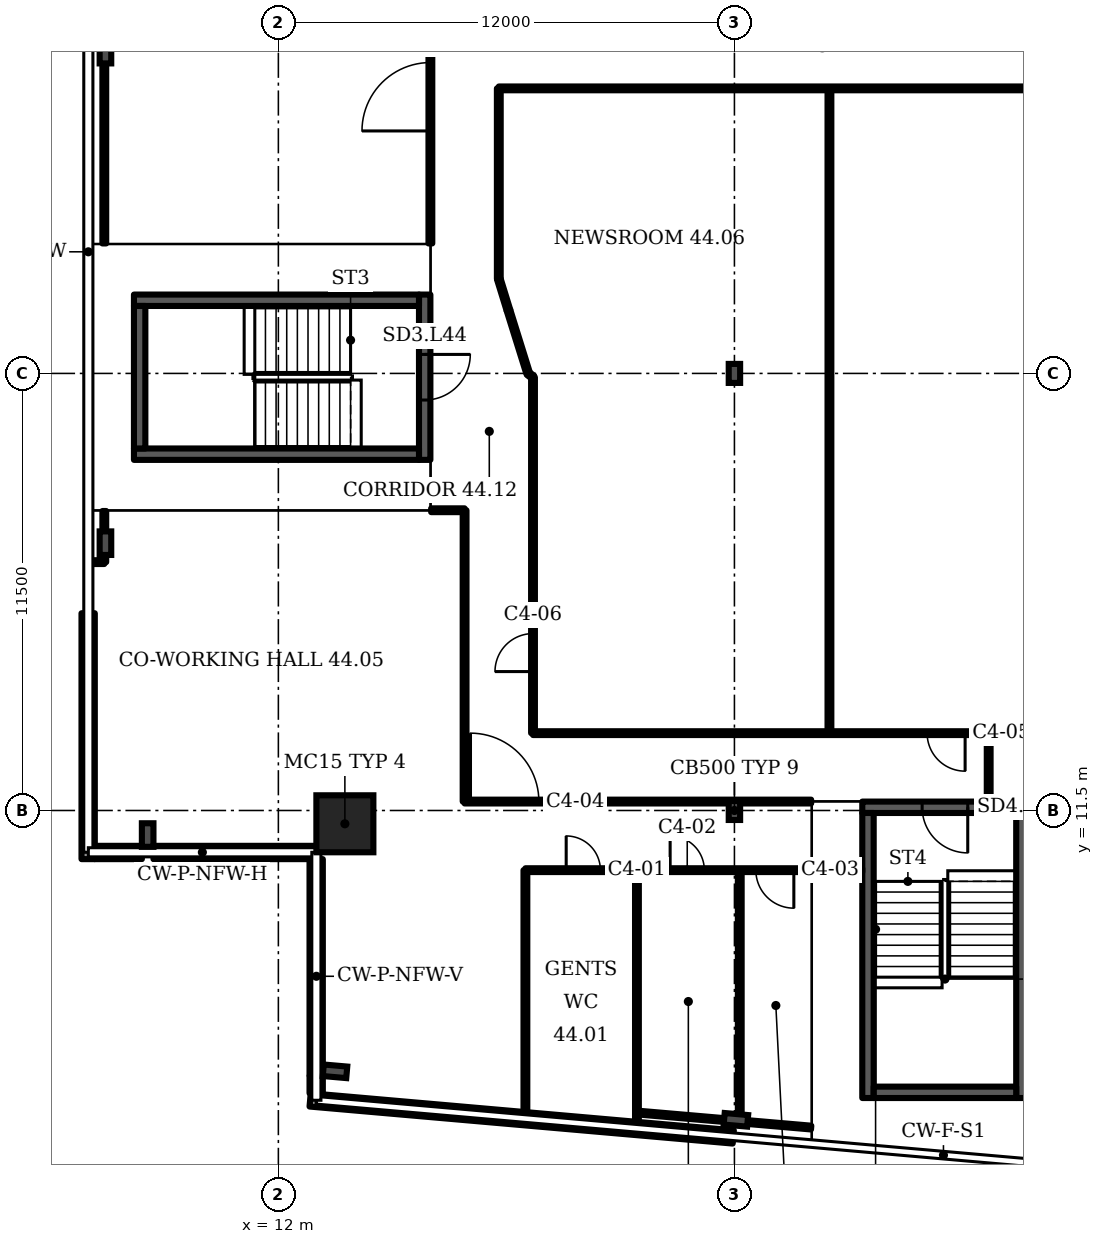
"""IFC4 building model, lengths in metres.
Left out: names, types, materials, properties, quantities, classifications, styles, units other than length and angle.
Written with IfcOpenShell. Run it as: python <this file> out.ifc"""

import sys

from ifc_helpers import new_model, si_unit, direction, frame, frame_2d, origin, origin_2d, place, context, subcontext, project, spatial, rectangle, i_section, extrude, element, fill, save


model = new_model("IFC4")
c1 = context("Model", 3, precision=1e-05, world=origin(), true_north=direction((0.0, 1.0)))
c2 = subcontext(c1, "Body", "Model", "MODEL_VIEW")
j1 = project(units=[si_unit("LENGTHUNIT", "METRE"), si_unit("PLANEANGLEUNIT", "RADIAN")], contexts=[c1])
p1 = place(None, origin())
s1 = spatial("IfcSite", under=j1, at=p1, CompositionType="ELEMENT")
p2 = place(p1, origin())
s2 = spatial("IfcBuilding", under=s1, at=p2, CompositionType="ELEMENT")
p3 = place(p2, frame((0.0, 0.0, 180.7)))
s3 = spatial("IfcBuildingStorey", under=s2, at=p3, CompositionType="ELEMENT", Elevation=180.7)
p4 = place(p3, frame((13.75, 11.15, 0.0), z_axis=(0.0, 0.0, 1.0), x_axis=(1.0, 0.0, 0.0)))
e1 = element("IfcColumn", 1, at=p4, inside=s3, PredefinedType="COLUMN", context=c2, shape_type="SweptSolid", body=[
    extrude(rectangle(XDim=1.5, YDim=1.5, at=origin_2d()), origin(), (0.0, 0.0, 1.0), 3.6),
])
for number, where, z_axis, x_axis in (
    (2, (13.491, 4.637, 0.0), (0.0, 0.0, 1.0), (-0.087, -0.996, 0.0)),
    (3, (24.039, 3.361, 0.0), (0.0, 0.0, 1.0), (-0.087, -0.996, 0.0)),
    (4, (7.45, 31.467, 0.0), (0.0, 0.0, 1.0), (-1.0, 0.0, 0.0)),
    (5, (7.45, 18.533, 0.0), (0.0, 0.0, 1.0), (-1.0, 0.0, 0.0)),
    (6, (8.561, 10.854, 0.0), (0.0, 0.0, 1.0), (-1.0, 0.0, 0.0)),
):
    element("IfcColumn", number, at=place(p3, frame(where, z_axis=z_axis, x_axis=x_axis)), inside=s3, PredefinedType="COLUMN", context=c2, shape_type="SweptSolid", body=[
        extrude(i_section(OverallWidth=0.305, OverallDepth=0.62, WebThickness=0.021, FlangeThickness=0.04, FilletRadius=0.027, at=origin_2d()), origin(), (0.0, 0.0, 1.0), 3.6),
    ])
for number, where, z_axis, x_axis in (
    (7, (24.0, 11.5, 0.0), (0.0, 0.0, 1.0), (1.0, 0.0, 0.0)),
    (8, (24.0, 23.0, 0.0), (0.0, 0.0, 1.0), (1.0, 0.0, 0.0)),
):
    element("IfcColumn", number, at=place(p3, frame(where, z_axis=z_axis, x_axis=x_axis)), inside=s3, PredefinedType="COLUMN", context=c2, shape_type="SweptSolid", body=[
        extrude(i_section(OverallWidth=0.3, OverallDepth=0.5, WebThickness=0.014, FlangeThickness=0.028, FilletRadius=0.027, at=origin_2d()), origin(), (0.0, 0.0, 1.0), 3.6),
    ])
p5 = place(p3, frame((12.835, 3.885, 0.0), z_axis=(0.0, 0.0, 1.0), x_axis=(0.996199, -0.087154, 0.0)))
e9 = element("IfcWall", 9, at=p5, inside=s3, PredefinedType="SOLIDWALL", context=c2, shape_type="SweptSolid", body=[
    extrude(rectangle(XDim=11.177, YDim=0.35, at=frame_2d((5.588, 0.0))), origin(), (0.0, 0.0, 1.0), 1.0),
])
p6 = place(p3, frame((6.995, 16.69, 0.0), z_axis=(0.0, 0.0, 1.0), x_axis=(0.0, -1.0, 0.0)))
e10 = element("IfcWall", 10, at=p6, inside=s3, PredefinedType="SOLIDWALL", context=c2, shape_type="SweptSolid", body=[
    extrude(rectangle(XDim=6.47, YDim=0.35, at=frame_2d((3.235, 0.0))), origin(), (0.0, 0.0, 1.0), 1.0),
])
p7 = place(p3, frame((7.17, 10.395, 0.0), z_axis=(0.0, 0.0, 1.0), x_axis=(1.0, 0.0, 0.0)))
e11 = element("IfcWall", 11, at=p7, inside=s3, PredefinedType="SOLIDWALL", context=c2, shape_type="SweptSolid", body=[
    extrude(rectangle(XDim=1.238, YDim=0.35, at=frame_2d((0.619, 0.0))), origin(), (0.0, 0.0, 1.0), 1.0),
])
p8 = place(p3, frame((8.713, 10.395, 0.0), z_axis=(0.0, 0.0, 1.0), x_axis=(1.0, 0.0, 0.0)))
e12 = element("IfcWall", 12, at=p8, inside=s3, PredefinedType="SOLIDWALL", context=c2, shape_type="SweptSolid", body=[
    extrude(rectangle(XDim=4.287, YDim=0.35, at=frame_2d((2.143, 0.0))), origin(), (0.0, 0.0, 1.0), 1.0),
])
p9 = place(p3, frame((12.995, 10.22, 0.0), z_axis=(0.0, 0.0, 1.0), x_axis=(0.0, -1.0, 0.0)))
e13 = element("IfcWall", 13, at=p9, inside=s3, PredefinedType="SOLIDWALL", context=c2, shape_type="SweptSolid", body=[
    extrude(rectangle(XDim=5.693, YDim=0.35, at=frame_2d((2.847, 0.0))), origin(), (0.0, 0.0, 1.0), 1.0),
])
p10 = place(p3, frame((12.995, 4.512, 0.0), z_axis=(0.0, 0.0, 1.0), x_axis=(0.0, -1.0, 0.0)))
e14 = element("IfcWall", 14, at=p10, inside=s3, PredefinedType="SOLIDWALL", context=c2, shape_type="SweptSolid", body=[
    extrude(rectangle(XDim=0.454, YDim=0.35, at=frame_2d((0.227, 0.0))), origin(), (0.0, 0.0, 1.0), 1.0),
])
p11 = place(p3, frame((15.85, 20.725, 0.0), z_axis=(0.0, 0.0, 1.0), x_axis=(0.0, 1.0, 0.0)))
e15 = element("IfcWall", 15, at=p11, inside=s3, PredefinedType="SHEAR", context=c2, shape_type="SweptSolid", body=[
    extrude(rectangle(XDim=4.35, YDim=0.3, at=frame_2d((2.175, 0.0))), origin(), (0.0, 0.0, 1.0), 3.2),
])
p12 = place(p11, frame((1.575, 0.0, 0.0)))
e16 = element("IfcOpeningElement", 16, at=p12, cuts=e15, PredefinedType="OPENING", context=c2, shape_type="SweptSolid", body=[
    extrude(rectangle(XDim=1.2, YDim=2.1, at=frame_2d((0.6, 1.05))), frame((0.0, 0.16, 0.0), z_axis=(0.0, -1.0, 0.0), x_axis=(1.0, 0.0, 0.0)), (0.0, 0.0, 1.0), 0.32),
])
p13 = place(p3, frame((27.364, 11.584, 0.0), z_axis=(0.0, 0.0, 1.0), x_axis=(1.0, 0.0, 0.0)))
e17 = element("IfcWall", 17, at=p13, inside=s3, PredefinedType="SHEAR", context=c2, shape_type="SweptSolid", body=[
    extrude(rectangle(XDim=4.35, YDim=0.3, at=frame_2d((2.175, 0.0))), origin(), (0.0, 0.0, 1.0), 3.2),
])
p14 = place(p13, frame((1.575, 0.0, 0.0)))
e18 = element("IfcOpeningElement", 18, at=p14, cuts=e17, PredefinedType="OPENING", context=c2, shape_type="SweptSolid", body=[
    extrude(rectangle(XDim=1.2, YDim=2.1, at=frame_2d((0.6, 1.05))), frame((0.0, 0.16, 0.0), z_axis=(0.0, -1.0, 0.0), x_axis=(1.0, 0.0, 0.0)), (0.0, 0.0, 1.0), 0.32),
])
p15 = place(p3, frame((7.02, 18.035, 0.0), z_axis=(0.0, 0.0, 1.0), x_axis=(1.0, 0.0, 0.0)))
e19 = element("IfcWall", 19, at=p15, inside=s3, PredefinedType="PARTITIONING", context=c2, shape_type="SweptSolid", body=[
    extrude(rectangle(XDim=0.4, YDim=0.1, at=frame_2d((0.2, 0.0))), origin(), (0.0, 0.0, 1.0), 3.2),
])
p16 = place(p3, frame((7.42, 18.035, 0.0), z_axis=(0.0, 0.0, 1.0), x_axis=(0.0, 1.0, 0.0)))
e20 = element("IfcWall", 20, at=p16, inside=s3, PredefinedType="PARTITIONING", context=c2, shape_type="SweptSolid", body=[
    extrude(rectangle(XDim=1.345, YDim=0.1, at=frame_2d((0.672, 0.0))), origin(), (0.0, 0.0, 1.0), 2.58),
])
p17 = place(p3, frame((7.42, 26.42, 0.0), z_axis=(0.0, 0.0, 1.0), x_axis=(0.0, 1.0, 0.0)))
e21 = element("IfcWall", 21, at=p17, inside=s3, PredefinedType="PARTITIONING", context=c2, shape_type="SweptSolid", body=[
    extrude(rectangle(XDim=15.56, YDim=0.1, at=frame_2d((7.78, 0.0))), origin(), (0.0, 0.0, 1.0), 2.58),
])
p18 = place(p3, frame((16.0, 26.42, 0.0), z_axis=(0.0, 0.0, 1.0), x_axis=(0.0, 1.0, 0.0)))
e22 = element("IfcWall", 22, at=p18, inside=s3, PredefinedType="PARTITIONING", context=c2, shape_type="SweptSolid", body=[
    extrude(rectangle(XDim=7.56, YDim=0.1, at=frame_2d((3.78, 0.0))), origin(), (0.0, 0.0, 1.0), 3.2),
])
p19 = place(p18, frame((2.96, 0.0, 0.0)))
e23 = element("IfcOpeningElement", 23, at=p19, cuts=e22, PredefinedType="OPENING", context=c2, shape_type="SweptSolid", body=[
    extrude(rectangle(XDim=1.8, YDim=2.1, at=frame_2d((0.9, 1.05))), frame((0.0, 0.06, 0.0), z_axis=(0.0, -1.0, 0.0), x_axis=(1.0, 0.0, 0.0)), (0.0, 0.0, 1.0), 0.12),
])
p20 = place(p3, frame((16.02, 19.4, 0.0), z_axis=(0.0, 0.0, 1.0), x_axis=(1.0, 0.0, 0.0)))
e24 = element("IfcWall", 24, at=p20, inside=s3, PredefinedType="PARTITIONING", context=c2, shape_type="SweptSolid", body=[
    extrude(rectangle(XDim=0.88, YDim=0.1, at=frame_2d((0.44, 0.0))), origin(), (0.0, 0.0, 1.0), 3.2),
])
p21 = place(p3, frame((16.9, 11.735, 0.0), z_axis=(0.0, 0.0, 1.0), x_axis=(0.0, 1.0, 0.0)))
e25 = element("IfcWall", 25, at=p21, inside=s3, PredefinedType="PARTITIONING", context=c2, shape_type="SweptSolid", body=[
    extrude(rectangle(XDim=7.665, YDim=0.1, at=frame_2d((3.833, 0.0))), origin(), (0.0, 0.0, 1.0), 3.2),
])
p22 = place(p3, frame((16.9, 11.735, 0.0), z_axis=(0.0, 0.0, 1.0), x_axis=(1.0, 0.0, 0.0)))
e26 = element("IfcWall", 26, at=p22, inside=s3, PredefinedType="PARTITIONING", context=c2, shape_type="SweptSolid", body=[
    extrude(rectangle(XDim=9.119, YDim=0.1, at=frame_2d((4.56, 0.0))), origin(), (0.0, 0.0, 1.0), 3.2),
])
p23 = place(p22, frame((0.155, 0.0, 0.0)))
e27 = element("IfcOpeningElement", 27, at=p23, cuts=e26, PredefinedType="OPENING", context=c2, shape_type="SweptSolid", body=[
    extrude(rectangle(XDim=1.8, YDim=2.1, at=frame_2d((0.9, 1.05))), frame((0.0, 0.06, 0.0), z_axis=(0.0, -1.0, 0.0), x_axis=(1.0, 0.0, 0.0)), (0.0, 0.0, 1.0), 0.12),
])
p24 = place(p3, frame((17.8, 25.485, 0.0), z_axis=(0.0, 0.0, 1.0), x_axis=(0.0, 1.0, 0.0)))
e28 = element("IfcWall", 28, at=p24, inside=s3, PredefinedType="PARTITIONING", context=c2, shape_type="SweptSolid", body=[
    extrude(rectangle(XDim=5.015, YDim=0.1, at=frame_2d((2.507, 0.0))), origin(), (0.0, 0.0, 1.0), 3.2),
])
p25 = place(p3, frame((17.8, 30.5, 0.0), z_axis=(0.0, 0.0, 1.0), x_axis=(1.0, 0.0, 0.0)))
e29 = element("IfcWall", 29, at=p25, inside=s3, PredefinedType="PARTITIONING", context=c2, shape_type="SweptSolid", body=[
    extrude(rectangle(XDim=19.05, YDim=0.1, at=frame_2d((9.525, 0.0))), origin(), (0.0, 0.0, 1.0), 3.2),
])
p26 = place(p3, frame((18.055, 24.66, 0.0), z_axis=(0.0, 0.0, 1.0), x_axis=(-0.295119, 0.955462, 0.0)))
e30 = element("IfcWall", 30, at=p26, inside=s3, PredefinedType="PARTITIONING", context=c2, shape_type="SweptSolid", body=[
    extrude(rectangle(XDim=0.864, YDim=0.1, at=frame_2d((0.432, 0.0))), origin(), (0.0, 0.0, 1.0), 3.2),
])
p27 = place(p3, frame((18.5, 3.414, 0.0), z_axis=(0.0, 0.0, 1.0), x_axis=(0.0, 1.0, 0.0)))
e31 = element("IfcWall", 31, at=p27, inside=s3, PredefinedType="PARTITIONING", context=c2, shape_type="SweptSolid", body=[
    extrude(rectangle(XDim=6.516, YDim=0.1, at=frame_2d((3.258, 0.0))), origin(), (0.0, 0.0, 1.0), 2.58),
])
p28 = place(p3, frame((18.5, 9.93, 0.0), z_axis=(0.0, 0.0, 1.0), x_axis=(1.0, 0.0, 0.0)))
e32 = element("IfcWall", 32, at=p28, inside=s3, PredefinedType="PARTITIONING", context=c2, shape_type="SweptSolid", body=[
    extrude(rectangle(XDim=8.864, YDim=0.1, at=frame_2d((4.432, 0.0))), origin(), (0.0, 0.0, 1.0), 3.2),
])
p29 = place(p28, frame((1.073, 0.0, 0.0)))
e33 = element("IfcOpeningElement", 33, at=p29, cuts=e32, PredefinedType="OPENING", context=c2, shape_type="SweptSolid", body=[
    extrude(rectangle(XDim=0.9, YDim=2.1, at=frame_2d((0.45, 1.05))), frame((0.0, 0.06, 0.0), z_axis=(0.0, -1.0, 0.0), x_axis=(1.0, 0.0, 0.0)), (0.0, 0.0, 1.0), 0.12),
])
p30 = place(p28, frame((3.808, 0.0, 0.0)))
e34 = element("IfcOpeningElement", 34, at=p30, cuts=e32, PredefinedType="OPENING", context=c2, shape_type="SweptSolid", body=[
    extrude(rectangle(XDim=0.9, YDim=2.1, at=frame_2d((0.45, 1.05))), frame((0.0, 0.06, 0.0), z_axis=(0.0, -1.0, 0.0), x_axis=(1.0, 0.0, 0.0)), (0.0, 0.0, 1.0), 0.12),
])
p31 = place(p28, frame((6.063, 0.0, 0.0)))
e35 = element("IfcOpeningElement", 35, at=p31, cuts=e32, PredefinedType="OPENING", context=c2, shape_type="SweptSolid", body=[
    extrude(rectangle(XDim=1.0, YDim=2.1, at=frame_2d((0.5, 1.05))), frame((0.0, 0.06, 0.0), z_axis=(0.0, -1.0, 0.0), x_axis=(1.0, 0.0, 0.0)), (0.0, 0.0, 1.0), 0.12),
])
p32 = place(p3, frame((18.575, 22.995, 0.0), z_axis=(0.0, 0.0, 1.0), x_axis=(-0.298155, 0.954516, 0.0)))
e36 = element("IfcWall", 36, at=p32, inside=s3, PredefinedType="PARTITIONING", context=c2, shape_type="SweptSolid", body=[
    extrude(rectangle(XDim=1.744, YDim=0.1, at=frame_2d((0.872, 0.0))), origin(), (0.0, 0.0, 1.0), 3.2),
])
p33 = place(p3, frame((18.7, 22.9, 0.0), z_axis=(0.0, 0.0, 1.0), x_axis=(-0.795501, 0.605948, 0.0)))
e37 = element("IfcWall", 37, at=p33, inside=s3, PredefinedType="PARTITIONING", context=c2, shape_type="SweptSolid", body=[
    extrude(rectangle(XDim=0.157, YDim=0.1, at=frame_2d((0.079, 0.0))), origin(), (0.0, 0.0, 1.0), 3.2),
])
p34 = place(p3, frame((18.7, 13.535, 0.0), z_axis=(0.0, 0.0, 1.0), x_axis=(0.0, 1.0, 0.0)))
e38 = element("IfcWall", 38, at=p34, inside=s3, PredefinedType="PARTITIONING", context=c2, shape_type="SweptSolid", body=[
    extrude(rectangle(XDim=9.365, YDim=0.1, at=frame_2d((4.683, 0.0))), origin(), (0.0, 0.0, 1.0), 3.2),
])
p35 = place(p34, frame((1.62, 0.0, 0.0)))
e39 = element("IfcOpeningElement", 39, at=p35, cuts=e38, PredefinedType="OPENING", context=c2, shape_type="SweptSolid", body=[
    extrude(rectangle(XDim=1.0, YDim=2.1, at=frame_2d((0.5, 1.05))), frame((0.0, 0.06, 0.0), z_axis=(0.0, -1.0, 0.0), x_axis=(1.0, 0.0, 0.0)), (0.0, 0.0, 1.0), 0.12),
])
p36 = place(p3, frame((18.7, 13.535, 0.0), z_axis=(0.0, 0.0, 1.0), x_axis=(1.0, 0.0, 0.0)))
e40 = element("IfcWall", 40, at=p36, inside=s3, PredefinedType="PARTITIONING", context=c2, shape_type="SweptSolid", body=[
    extrude(rectangle(XDim=11.99, YDim=0.1, at=frame_2d((5.995, 0.0))), origin(), (0.0, 0.0, 1.0), 3.2),
])
p37 = place(p36, frame((10.37, 0.0, 0.0)))
e41 = element("IfcOpeningElement", 41, at=p37, cuts=e40, PredefinedType="OPENING", context=c2, shape_type="SweptSolid", body=[
    extrude(rectangle(XDim=1.0, YDim=2.1, at=frame_2d((0.5, 1.05))), frame((0.0, 0.06, 0.0), z_axis=(0.0, -1.0, 0.0), x_axis=(1.0, 0.0, 0.0)), (0.0, 0.0, 1.0), 0.12),
])
p38 = place(p3, frame((21.435, 3.165, 0.0), z_axis=(0.0, 0.0, 1.0), x_axis=(0.0, 1.0, 0.0)))
e42 = element("IfcWall", 42, at=p38, inside=s3, PredefinedType="PARTITIONING", context=c2, shape_type="SweptSolid", body=[
    extrude(rectangle(XDim=6.765, YDim=0.1, at=frame_2d((3.382, 0.0))), origin(), (0.0, 0.0, 1.0), 2.58),
])
p39 = place(p3, frame((24.14, 3.32, 0.0), z_axis=(0.0, 0.0, 1.0), x_axis=(0.0, 1.0, 0.0)))
e43 = element("IfcWall", 43, at=p39, inside=s3, PredefinedType="PARTITIONING", context=c2, shape_type="SweptSolid", body=[
    extrude(rectangle(XDim=6.61, YDim=0.1, at=frame_2d((3.305, 0.0))), origin(), (0.0, 0.0, 1.0), 3.2),
])
p40 = place(p3, frame((26.019, 3.157, 0.0), z_axis=(0.0, 0.0, 1.0), x_axis=(-0.996266, 0.086322, 0.0)))
e44 = element("IfcWall", 44, at=p40, inside=s3, PredefinedType="PARTITIONING", context=c2, shape_type="SweptSolid", body=[
    extrude(rectangle(XDim=4.556, YDim=0.1, at=frame_2d((2.278, 0.0))), origin(), (0.0, 0.0, 1.0), 2.58),
])
p41 = place(p3, frame((26.5, 13.535, 0.0), z_axis=(0.0, 0.0, 1.0), x_axis=(0.0, 1.0, 0.0)))
e45 = element("IfcWall", 45, at=p41, inside=s3, PredefinedType="PARTITIONING", context=c2, shape_type="SweptSolid", body=[
    extrude(rectangle(XDim=16.965, YDim=0.1, at=frame_2d((8.482, 0.0))), origin(), (0.0, 0.0, 1.0), 3.2),
])
p42 = place(p3, frame((30.69, 11.754, 0.0), z_axis=(0.0, 0.0, 1.0), x_axis=(0.0, 1.0, 0.0)))
e46 = element("IfcWall", 46, at=p42, inside=s3, PredefinedType="PARTITIONING", context=c2, shape_type="SweptSolid", body=[
    extrude(rectangle(XDim=1.781, YDim=0.1, at=frame_2d((0.89, 0.0))), origin(), (0.0, 0.0, 1.0), 3.2),
])
for number, where, z_axis, x_axis in (
    (47, (8.2, 20.875, 0.0), (0.0, 0.0, 1.0), (1.0, 0.0, 0.0)),
    (48, (8.2, 24.925, 0.0), (0.0, 0.0, 1.0), (1.0, 0.0, 0.0)),
):
    element("IfcWall", number, at=place(p3, frame(where, z_axis=z_axis, x_axis=x_axis)), inside=s3, PredefinedType="SHEAR", context=c2, shape_type="SweptSolid", body=[
        extrude(rectangle(XDim=7.5, YDim=0.3, at=frame_2d((3.75, 0.0))), origin(), (0.0, 0.0, 1.0), 3.2),
    ])
p43 = place(p3, frame((8.35, 21.025, 0.0), z_axis=(0.0, 0.0, 1.0), x_axis=(0.0, 1.0, 0.0)))
e49 = element("IfcWall", 49, at=p43, inside=s3, PredefinedType="SHEAR", context=c2, shape_type="SweptSolid", body=[
    extrude(rectangle(XDim=3.75, YDim=0.3, at=frame_2d((1.875, 0.0))), origin(), (0.0, 0.0, 1.0), 3.2),
])
for number, where, z_axis, x_axis in (
    (50, (27.514, 3.934, 0.0), (0.0, 0.0, 1.0), (0.0, 1.0, 0.0)),
    (51, (31.564, 3.934, 0.0), (0.0, 0.0, 1.0), (0.0, 1.0, 0.0)),
):
    element("IfcWall", number, at=place(p3, frame(where, z_axis=z_axis, x_axis=x_axis)), inside=s3, PredefinedType="SHEAR", context=c2, shape_type="SweptSolid", body=[
        extrude(rectangle(XDim=7.5, YDim=0.3, at=frame_2d((3.75, 0.0))), origin(), (0.0, 0.0, 1.0), 3.2),
    ])
p44 = place(p3, frame((27.664, 4.084, 0.0), z_axis=(0.0, 0.0, 1.0), x_axis=(1.0, 0.0, 0.0)))
e52 = element("IfcWall", 52, at=p44, inside=s3, PredefinedType="SHEAR", context=c2, shape_type="SweptSolid", body=[
    extrude(rectangle(XDim=3.75, YDim=0.3, at=frame_2d((1.875, 0.0))), origin(), (0.0, 0.0, 1.0), 3.2),
])
p45 = place(p12, origin())
e53 = element("IfcDoor", 53, at=p45, inside=s3, OperationType="SINGLE_SWING_RIGHT", PredefinedType="DOOR", context=c2, shape_type="SweptSolid", body=[
    extrude(rectangle(XDim=1.2, YDim=2.1, at=frame_2d((0.6, 1.05))), frame((0.0, 0.025, 0.0), z_axis=(0.0, -1.0, 0.0), x_axis=(1.0, 0.0, 0.0)), (0.0, 0.0, 1.0), 0.05),
])
fill(e16, e53)
p46 = place(p14, origin())
e54 = element("IfcDoor", 54, at=p46, inside=s3, OperationType="SINGLE_SWING_RIGHT", PredefinedType="DOOR", context=c2, shape_type="SweptSolid", body=[
    extrude(rectangle(XDim=1.2, YDim=2.1, at=frame_2d((0.6, 1.05))), frame((0.0, 0.025, 0.0), z_axis=(0.0, -1.0, 0.0), x_axis=(1.0, 0.0, 0.0)), (0.0, 0.0, 1.0), 0.05),
])
fill(e18, e54)
p47 = place(p29, origin())
e55 = element("IfcDoor", 55, at=p47, inside=s3, OperationType="SINGLE_SWING_LEFT", PredefinedType="DOOR", context=c2, shape_type="SweptSolid", body=[
    extrude(rectangle(XDim=0.9, YDim=2.1, at=frame_2d((0.45, 1.05))), frame((0.0, 0.025, 0.0), z_axis=(0.0, -1.0, 0.0), x_axis=(1.0, 0.0, 0.0)), (0.0, 0.0, 1.0), 0.05),
])
fill(e33, e55)
p48 = place(p30, origin())
e56 = element("IfcDoor", 56, at=p48, inside=s3, OperationType="SINGLE_SWING_LEFT", PredefinedType="DOOR", context=c2, shape_type="SweptSolid", body=[
    extrude(rectangle(XDim=0.9, YDim=2.1, at=frame_2d((0.45, 1.05))), frame((0.0, 0.025, 0.0), z_axis=(0.0, -1.0, 0.0), x_axis=(1.0, 0.0, 0.0)), (0.0, 0.0, 1.0), 0.05),
])
fill(e34, e56)
p49 = place(p31, origin())
e57 = element("IfcDoor", 57, at=p49, inside=s3, OperationType="SINGLE_SWING_RIGHT", PredefinedType="DOOR", context=c2, shape_type="SweptSolid", body=[
    extrude(rectangle(XDim=1.0, YDim=2.1, at=frame_2d((0.5, 1.05))), frame((0.0, 0.025, 0.0), z_axis=(0.0, -1.0, 0.0), x_axis=(1.0, 0.0, 0.0)), (0.0, 0.0, 1.0), 0.05),
])
fill(e35, e57)
p50 = place(p23, origin())
e58 = element("IfcDoor", 58, at=p50, inside=s3, OperationType="DOUBLE_DOOR_SINGLE_SWING", PredefinedType="DOOR", context=c2, shape_type="SweptSolid", body=[
    extrude(rectangle(XDim=1.8, YDim=2.1, at=frame_2d((0.9, 1.05))), frame((0.0, 0.025, 0.0), z_axis=(0.0, -1.0, 0.0), x_axis=(1.0, 0.0, 0.0)), (0.0, 0.0, 1.0), 0.05),
])
fill(e27, e58)
p51 = place(p37, origin())
e59 = element("IfcDoor", 59, at=p51, inside=s3, OperationType="SINGLE_SWING_RIGHT", PredefinedType="DOOR", context=c2, shape_type="SweptSolid", body=[
    extrude(rectangle(XDim=1.0, YDim=2.1, at=frame_2d((0.5, 1.05))), frame((0.0, 0.025, 0.0), z_axis=(0.0, -1.0, 0.0), x_axis=(1.0, 0.0, 0.0)), (0.0, 0.0, 1.0), 0.05),
])
fill(e41, e59)
p52 = place(p35, origin())
e60 = element("IfcDoor", 60, at=p52, inside=s3, OperationType="SINGLE_SWING_LEFT", PredefinedType="DOOR", context=c2, shape_type="SweptSolid", body=[
    extrude(rectangle(XDim=1.0, YDim=2.1, at=frame_2d((0.5, 1.05))), frame((0.0, 0.025, 0.0), z_axis=(0.0, -1.0, 0.0), x_axis=(1.0, 0.0, 0.0)), (0.0, 0.0, 1.0), 0.05),
])
fill(e39, e60)
p53 = place(p19, origin())
e61 = element("IfcDoor", 61, at=p53, inside=s3, OperationType="DOUBLE_DOOR_SINGLE_SWING", PredefinedType="DOOR", context=c2, shape_type="SweptSolid", body=[
    extrude(rectangle(XDim=1.8, YDim=2.1, at=frame_2d((0.9, 1.05))), frame((0.0, 0.025, 0.0), z_axis=(0.0, -1.0, 0.0), x_axis=(1.0, 0.0, 0.0)), (0.0, 0.0, 1.0), 0.05),
])
fill(e23, e61)
save(model, sys.argv[1])
